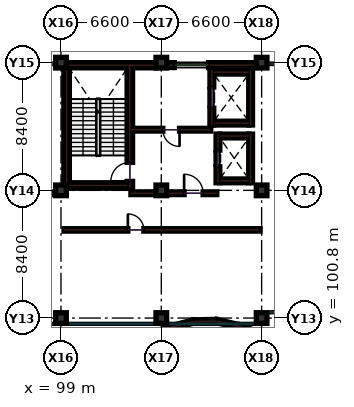
"""IFC4 building model, lengths in metres.
Left out: names, types, materials, properties, quantities, classifications, styles, units other than length and angle.
Written with IfcOpenShell. Run it as: python <this file> out.ifc"""

import sys

from ifc_helpers import new_model, si_unit, direction, frame, frame_2d, origin, origin_2d, place, context, subcontext, project, spatial, rectangle, extrude, element, fill, save


model = new_model("IFC4")
c1 = context("Model", 3, precision=1e-05, world=origin(), true_north=direction((0.0, 1.0)))
c2 = subcontext(c1, "Body", "Model", "MODEL_VIEW")
j1 = project(units=[si_unit("LENGTHUNIT", "METRE"), si_unit("PLANEANGLEUNIT", "RADIAN")], contexts=[c1])
p1 = place(None, origin())
s1 = spatial("IfcSite", under=j1, at=p1, CompositionType="ELEMENT")
p2 = place(p1, origin())
s2 = spatial("IfcBuilding", under=s1, at=p2, CompositionType="ELEMENT")
p3 = place(p2, frame((0.0, 0.0, 5.4)))
s3 = spatial("IfcBuildingStorey", under=s2, at=p3, CompositionType="ELEMENT", Elevation=5.4)
for number, where, z_axis, x_axis in (
    (1, (99.0, 100.8, 0.0), (0.0, 0.0, 1.0), (1.0, 0.0, 0.0)),
    (2, (99.0, 109.2, 0.0), (0.0, 0.0, 1.0), (1.0, 0.0, 0.0)),
    (3, (99.0, 117.6, 0.0), (0.0, 0.0, 1.0), (1.0, 0.0, 0.0)),
    (4, (105.6, 100.8, 0.0), (0.0, 0.0, 1.0), (1.0, 0.0, 0.0)),
    (5, (105.6, 109.2, 0.0), (0.0, 0.0, 1.0), (1.0, 0.0, 0.0)),
    (6, (105.6, 117.6, 0.0), (0.0, 0.0, 1.0), (1.0, 0.0, 0.0)),
    (7, (112.2, 100.8, 0.0), (0.0, 0.0, 1.0), (1.0, 0.0, 0.0)),
    (8, (112.2, 109.2, 0.0), (0.0, 0.0, 1.0), (1.0, 0.0, 0.0)),
    (9, (112.2, 117.6, 0.0), (0.0, 0.0, 1.0), (1.0, 0.0, 0.0)),
):
    element("IfcColumn", number, at=place(p3, frame(where, z_axis=z_axis, x_axis=x_axis)), inside=s3, PredefinedType="COLUMN", context=c2, shape_type="SweptSolid", body=[
        extrude(rectangle(XDim=0.7, YDim=0.7, at=origin_2d()), origin(), (0.0, 0.0, 1.0), 4.5),
    ])
p4 = place(p3, frame((92.85, 109.0, 0.0), z_axis=(0.0, 0.0, 1.0), x_axis=(1.0, 0.0, 0.0)))
e10 = element("IfcWall", 10, at=p4, inside=s3, PredefinedType="PARTITIONING", context=c2, shape_type="SweptSolid", body=[
    extrude(rectangle(XDim=6.45, YDim=0.16, at=frame_2d((3.225, 0.0))), origin(), (0.0, 0.0, 1.0), 3.435),
])
p5 = place(p3, frame((99.2, 106.6, 0.0), z_axis=(0.0, 0.0, 1.0), x_axis=(1.0, 0.0, 0.0)))
e11 = element("IfcWall", 11, at=p5, inside=s3, PredefinedType="PARTITIONING", context=c2, shape_type="SweptSolid", body=[
    extrude(rectangle(XDim=12.9, YDim=0.16, at=frame_2d((6.45, 0.0))), origin(), (0.0, 0.0, 1.0), 3.45),
])
p6 = place(p5, frame((4.2, 0.0, 0.0)))
e12 = element("IfcOpeningElement", 12, at=p6, cuts=e11, PredefinedType="OPENING", context=c2, shape_type="SweptSolid", body=[
    extrude(rectangle(XDim=1.05, YDim=2.15, at=frame_2d((0.525, 1.075))), frame((0.0, 0.09, 0.0), z_axis=(0.0, -1.0, 0.0), x_axis=(1.0, 0.0, 0.0)), (0.0, 0.0, 1.0), 0.18),
])
p7 = place(p3, frame((105.255, 117.43, 0.0), z_axis=(0.0, 0.0, 1.0), x_axis=(-1.0, 0.0, 0.0)))
e13 = element("IfcWall", 13, at=p7, inside=s3, PredefinedType="SHEAR", context=c2, shape_type="SweptSolid", body=[
    extrude(rectangle(XDim=5.91, YDim=0.34, at=frame_2d((2.955, 0.0))), origin(), (0.0, 0.0, 1.0), 4.2),
])
p8 = place(p3, frame((111.855, 117.44, 0.0), z_axis=(0.0, 0.0, 1.0), x_axis=(-1.0, 0.0, 0.0)))
e14 = element("IfcWall", 14, at=p8, inside=s3, PredefinedType="SOLIDWALL", context=c2, shape_type="SweptSolid", body=[
    extrude(rectangle(XDim=5.91, YDim=0.32, at=frame_2d((2.955, 0.0))), origin(), (0.0, 0.0, 1.0), 3.585),
])
p9 = place(p8, frame((3.15, 0.0, 0.95)))
e15 = element("IfcOpeningElement", 15, at=p9, cuts=e14, PredefinedType="OPENING", context=c2, shape_type="SweptSolid", body=[
    extrude(rectangle(XDim=2.25, YDim=1.55, at=frame_2d((1.125, 0.775))), frame((0.0, 0.17, 0.0), z_axis=(0.0, -1.0, 0.0), x_axis=(1.0, 0.0, 0.0)), (0.0, 0.0, 1.0), 0.34),
])
p10 = place(p3, frame((97.305, 100.23, 0.0), z_axis=(0.0, 0.0, 1.0), x_axis=(0.935447403013, -0.353465919427, 0.0)))
e16 = element("IfcWall", 16, at=p10, inside=s3, PredefinedType="SOLIDWALL", context=c2, shape_type="SweptSolid", body=[
    extrude(rectangle(XDim=1.598, YDim=0.22, at=frame_2d((0.799, 0.0))), origin(), (0.0, 0.0, 1.0), 1.45),
])
p11 = place(p3, frame((104.68, 99.59, 0.0), z_axis=(0.0, 0.0, 1.0), x_axis=(0.933365245405, 0.358928013215, 0.0)))
e17 = element("IfcWall", 17, at=p11, inside=s3, PredefinedType="SOLIDWALL", context=c2, shape_type="SweptSolid", body=[
    extrude(rectangle(XDim=1.602, YDim=0.22, at=frame_2d((0.801, 0.0))), origin(), (0.0, 0.0, 1.0), 1.45),
])
p12 = place(p3, frame((106.19, 100.17, 0.0), z_axis=(0.0, 0.0, 1.0), x_axis=(0.966607208407, 0.256262569753, 0.0)))
e18 = element("IfcWall", 18, at=p12, inside=s3, PredefinedType="SOLIDWALL", context=c2, shape_type="SweptSolid", body=[
    extrude(rectangle(XDim=1.542, YDim=0.22, at=frame_2d((0.771, 0.0))), origin(), (0.0, 0.0, 1.0), 1.45),
])
p13 = place(p3, frame((107.71, 100.57, 0.0), z_axis=(0.0, 0.0, 1.0), x_axis=(0.99972748265, 0.023344387658, 0.0)))
e19 = element("IfcWall", 19, at=p13, inside=s3, PredefinedType="SOLIDWALL", context=c2, shape_type="SweptSolid", body=[
    extrude(rectangle(XDim=1.496, YDim=0.22, at=frame_2d((0.748, 0.0))), origin(), (0.0, 0.0, 1.0), 1.45),
])
p14 = place(p3, frame((109.24, 100.6, 0.0), z_axis=(0.0, 0.0, 1.0), x_axis=(0.974364373169, -0.224975706019, 0.0)))
e20 = element("IfcWall", 20, at=p14, inside=s3, PredefinedType="SOLIDWALL", context=c2, shape_type="SweptSolid", body=[
    extrude(rectangle(XDim=1.534, YDim=0.22, at=frame_2d((0.767, 0.0))), origin(), (0.0, 0.0, 1.0), 1.45),
])
p15 = place(p3, frame((110.755, 100.25, 0.0), z_axis=(0.0, 0.0, 1.0), x_axis=(0.935447403013, -0.353465919427, 0.0)))
e21 = element("IfcWall", 21, at=p15, inside=s3, PredefinedType="SOLIDWALL", context=c2, shape_type="SweptSolid", body=[
    extrude(rectangle(XDim=1.598, YDim=0.22, at=frame_2d((0.799, 0.0))), origin(), (0.0, 0.0, 1.0), 1.45),
])
p16 = place(p3, frame((99.37, 109.34, 0.0), z_axis=(0.0, 0.0, 1.0), x_axis=(0.0, 1.0, 0.0)))
e22 = element("IfcWall", 22, at=p16, inside=s3, PredefinedType="SHEAR", context=c2, shape_type="SweptSolid", body=[
    extrude(rectangle(XDim=8.09, YDim=0.36, at=frame_2d((4.045, 0.0))), origin(), (0.0, 0.0, 1.0), 4.2),
])
p17 = place(p3, frame((103.53, 109.34, 0.0), z_axis=(0.0, 0.0, 1.0), x_axis=(0.0, 1.0, 0.0)))
e23 = element("IfcWall", 23, at=p17, inside=s3, PredefinedType="SHEAR", context=c2, shape_type="SweptSolid", body=[
    extrude(rectangle(XDim=8.09, YDim=0.36, at=frame_2d((4.045, 0.0))), origin(), (0.0, 0.0, 1.0), 4.2),
])
p18 = place(p17, frame((0.45, 0.0, 0.0)))
e24 = element("IfcOpeningElement", 24, at=p18, cuts=e23, PredefinedType="OPENING", context=c2, shape_type="SweptSolid", body=[
    extrude(rectangle(XDim=1.25, YDim=2.15, at=frame_2d((0.625, 1.075))), frame((0.0, 0.19, 0.0), z_axis=(0.0, -1.0, 0.0), x_axis=(1.0, 0.0, 0.0)), (0.0, 0.0, 1.0), 0.38),
])
p19 = place(p3, frame((99.55, 109.52, 0.0), z_axis=(0.0, 0.0, 1.0), x_axis=(1.0, 0.0, 0.0)))
e25 = element("IfcWall", 25, at=p19, inside=s3, PredefinedType="SHEAR", context=c2, shape_type="SweptSolid", body=[
    extrude(rectangle(XDim=3.8, YDim=0.36, at=frame_2d((1.9, 0.0))), origin(), (0.0, 0.0, 1.0), 4.2),
])
p20 = place(p3, frame((109.325, 109.7, 0.0), z_axis=(0.0, 0.0, 1.0), x_axis=(0.0, 1.0, 0.0)))
e26 = element("IfcWall", 26, at=p20, inside=s3, PredefinedType="SHEAR", context=c2, shape_type="SweptSolid", body=[
    extrude(rectangle(XDim=3.2, YDim=0.25, at=frame_2d((1.6, 0.0))), origin(), (0.0, 0.0, 1.0), 4.2),
])
p21 = place(p20, frame((1.05, 0.0, 0.0)))
e27 = element("IfcOpeningElement", 27, at=p21, cuts=e26, PredefinedType="OPENING", context=c2, shape_type="SweptSolid", body=[
    extrude(rectangle(XDim=1.1, YDim=2.15, at=frame_2d((0.55, 1.075))), frame((0.0, 0.135, 0.0), z_axis=(0.0, -1.0, 0.0), x_axis=(1.0, 0.0, 0.0)), (0.0, 0.0, 1.0), 0.27),
])
p22 = place(p3, frame((111.475, 109.7, 0.0), z_axis=(0.0, 0.0, 1.0), x_axis=(0.0, 1.0, 0.0)))
e28 = element("IfcWall", 28, at=p22, inside=s3, PredefinedType="SHEAR", context=c2, shape_type="SweptSolid", body=[
    extrude(rectangle(XDim=3.2, YDim=0.25, at=frame_2d((1.6, 0.0))), origin(), (0.0, 0.0, 1.0), 4.2),
])
for number, where, z_axis, x_axis in (
    (29, (109.45, 109.825, 0.0), (0.0, 0.0, 1.0), (1.0, 0.0, 0.0)),
    (30, (109.45, 112.775, 0.0), (0.0, 0.0, 1.0), (1.0, 0.0, 0.0)),
):
    element("IfcWall", number, at=place(p3, frame(where, z_axis=z_axis, x_axis=x_axis)), inside=s3, PredefinedType="SHEAR", context=c2, shape_type="SweptSolid", body=[
        extrude(rectangle(XDim=1.9, YDim=0.25, at=frame_2d((0.95, 0.0))), origin(), (0.0, 0.0, 1.0), 4.2),
    ])
p23 = place(p3, frame((108.925, 113.5, 0.0), z_axis=(0.0, 0.0, 1.0), x_axis=(0.0, 1.0, 0.0)))
e31 = element("IfcWall", 31, at=p23, inside=s3, PredefinedType="SHEAR", context=c2, shape_type="SweptSolid", body=[
    extrude(rectangle(XDim=3.6, YDim=0.25, at=frame_2d((1.8, 0.0))), origin(), (0.0, 0.0, 1.0), 4.2),
])
p24 = place(p23, frame((1.1, 0.0, 0.0)))
e32 = element("IfcOpeningElement", 32, at=p24, cuts=e31, PredefinedType="OPENING", context=c2, shape_type="SweptSolid", body=[
    extrude(rectangle(XDim=1.4, YDim=2.2, at=frame_2d((0.7, 1.1))), frame((0.0, 0.135, 0.0), z_axis=(0.0, -1.0, 0.0), x_axis=(1.0, 0.0, 0.0)), (0.0, 0.0, 1.0), 0.27),
])
p25 = place(p3, frame((111.475, 113.5, 0.0), z_axis=(0.0, 0.0, 1.0), x_axis=(0.0, 1.0, 0.0)))
e33 = element("IfcWall", 33, at=p25, inside=s3, PredefinedType="SHEAR", context=c2, shape_type="SweptSolid", body=[
    extrude(rectangle(XDim=3.6, YDim=0.25, at=frame_2d((1.8, 0.0))), origin(), (0.0, 0.0, 1.0), 4.2),
])
for number, where, z_axis, x_axis in (
    (34, (109.05, 113.625, 0.0), (0.0, 0.0, 1.0), (1.0, 0.0, 0.0)),
    (35, (109.05, 116.975, 0.0), (0.0, 0.0, 1.0), (1.0, 0.0, 0.0)),
):
    element("IfcWall", number, at=place(p3, frame(where, z_axis=z_axis, x_axis=x_axis)), inside=s3, PredefinedType="SHEAR", context=c2, shape_type="SweptSolid", body=[
        extrude(rectangle(XDim=2.3, YDim=0.25, at=frame_2d((1.15, 0.0))), origin(), (0.0, 0.0, 1.0), 4.2),
    ])
p26 = place(p3, frame((103.6, 109.01, 0.0), z_axis=(0.0, 0.0, 1.0), x_axis=(1.0, 0.0, 0.0)))
e36 = element("IfcWall", 36, at=p26, inside=s3, PredefinedType="SOLIDWALL", context=c2, shape_type="SweptSolid", body=[
    extrude(rectangle(XDim=1.65, YDim=0.18, at=frame_2d((0.825, 0.0))), origin(), (0.0, 0.0, 1.0), 3.435),
])
p27 = place(p3, frame((105.95, 109.01, 0.0), z_axis=(0.0, 0.0, 1.0), x_axis=(1.0, 0.0, 0.0)))
e37 = element("IfcWall", 37, at=p27, inside=s3, PredefinedType="SOLIDWALL", context=c2, shape_type="SweptSolid", body=[
    extrude(rectangle(XDim=3.3, YDim=0.18, at=frame_2d((1.65, 0.0))), origin(), (0.0, 0.0, 1.0), 3.435),
])
p28 = place(p27, frame((1.15, 0.0, 0.0)))
e38 = element("IfcOpeningElement", 38, at=p28, cuts=e37, PredefinedType="OPENING", context=c2, shape_type="SweptSolid", body=[
    extrude(rectangle(XDim=1.25, YDim=2.15, at=frame_2d((0.625, 1.075))), frame((0.0, 0.1, 0.0), z_axis=(0.0, -1.0, 0.0), x_axis=(1.0, 0.0, 0.0)), (0.0, 0.0, 1.0), 0.2),
])
p29 = place(p3, frame((103.6, 113.19, 0.0), z_axis=(0.0, 0.0, 1.0), x_axis=(1.0, 0.0, 0.0)))
e39 = element("IfcWall", 39, at=p29, inside=s3, PredefinedType="SOLIDWALL", context=c2, shape_type="SweptSolid", body=[
    extrude(rectangle(XDim=5.25, YDim=0.18, at=frame_2d((2.625, 0.0))), origin(), (0.0, 0.0, 1.0), 4.2),
])
p30 = place(p29, frame((2.1, 0.0, 0.0)))
e40 = element("IfcOpeningElement", 40, at=p30, cuts=e39, PredefinedType="OPENING", context=c2, shape_type="SweptSolid", body=[
    extrude(rectangle(XDim=1.1, YDim=2.15, at=frame_2d((0.55, 1.075))), frame((0.0, 0.1, 0.0), z_axis=(0.0, -1.0, 0.0), x_axis=(1.0, 0.0, 0.0)), (0.0, 0.0, 1.0), 0.2),
])
p31 = place(p6, origin())
e41 = element("IfcDoor", 41, at=p31, inside=s3, OperationType="SINGLE_SWING_LEFT", PredefinedType="DOOR", context=c2, shape_type="SweptSolid", body=[
    extrude(rectangle(XDim=1.05, YDim=2.15, at=frame_2d((0.525, 1.075))), frame((0.0, 0.025, 0.0), z_axis=(0.0, -1.0, 0.0), x_axis=(1.0, 0.0, 0.0)), (0.0, 0.0, 1.0), 0.05),
])
fill(e12, e41)
p32 = place(p9, origin())
e42 = element("IfcWindow", 42, at=p32, inside=s3, PartitioningType="SINGLE_PANEL", PredefinedType="WINDOW", context=c2, shape_type="SweptSolid", body=[
    extrude(rectangle(XDim=2.25, YDim=1.55, at=frame_2d((1.125, 0.775))), frame((0.0, 0.03, 0.0), z_axis=(0.0, -1.0, 0.0), x_axis=(1.0, 0.0, 0.0)), (0.0, 0.0, 1.0), 0.06),
])
fill(e15, e42)
p33 = place(p18, origin())
e43 = element("IfcDoor", 43, at=p33, inside=s3, OperationType="SINGLE_SWING_LEFT", PredefinedType="DOOR", context=c2, shape_type="SweptSolid", body=[
    extrude(rectangle(XDim=1.25, YDim=2.15, at=frame_2d((0.625, 1.075))), frame((0.0, 0.025, 0.0), z_axis=(0.0, -1.0, 0.0), x_axis=(1.0, 0.0, 0.0)), (0.0, 0.0, 1.0), 0.05),
])
fill(e24, e43)
p34 = place(p21, origin())
e44 = element("IfcDoor", 44, at=p34, inside=s3, OperationType="SLIDING_TO_LEFT", PredefinedType="DOOR", context=c2, shape_type="SweptSolid", body=[
    extrude(rectangle(XDim=1.1, YDim=2.15, at=frame_2d((0.55, 1.075))), frame((0.0, 0.025, 0.0), z_axis=(0.0, -1.0, 0.0), x_axis=(1.0, 0.0, 0.0)), (0.0, 0.0, 1.0), 0.05),
])
fill(e27, e44)
p35 = place(p24, origin())
e45 = element("IfcDoor", 45, at=p35, inside=s3, OperationType="SLIDING_TO_LEFT", PredefinedType="DOOR", context=c2, shape_type="SweptSolid", body=[
    extrude(rectangle(XDim=1.4, YDim=2.2, at=frame_2d((0.7, 1.1))), frame((0.0, 0.025, 0.0), z_axis=(0.0, -1.0, 0.0), x_axis=(1.0, 0.0, 0.0)), (0.0, 0.0, 1.0), 0.05),
])
fill(e32, e45)
p36 = place(p28, origin())
e46 = element("IfcDoor", 46, at=p36, inside=s3, OperationType="SINGLE_SWING_LEFT", PredefinedType="DOOR", context=c2, shape_type="SweptSolid", body=[
    extrude(rectangle(XDim=1.25, YDim=2.15, at=frame_2d((0.625, 1.075))), frame((0.0, 0.025, 0.0), z_axis=(0.0, -1.0, 0.0), x_axis=(1.0, 0.0, 0.0)), (0.0, 0.0, 1.0), 0.05),
])
fill(e38, e46)
p37 = place(p30, frame((1.1, 0.0, 0.0), z_axis=(0.0, 0.0, 1.0), x_axis=(-1.0, 0.0, 0.0)))
e47 = element("IfcDoor", 47, at=p37, inside=s3, OperationType="SINGLE_SWING_RIGHT", PredefinedType="DOOR", context=c2, shape_type="SweptSolid", body=[
    extrude(rectangle(XDim=1.1, YDim=2.15, at=frame_2d((0.55, 1.075))), frame((0.0, 0.025, 0.0), z_axis=(0.0, -1.0, 0.0), x_axis=(1.0, 0.0, 0.0)), (0.0, 0.0, 1.0), 0.05),
])
fill(e40, e47)
save(model, sys.argv[1])
